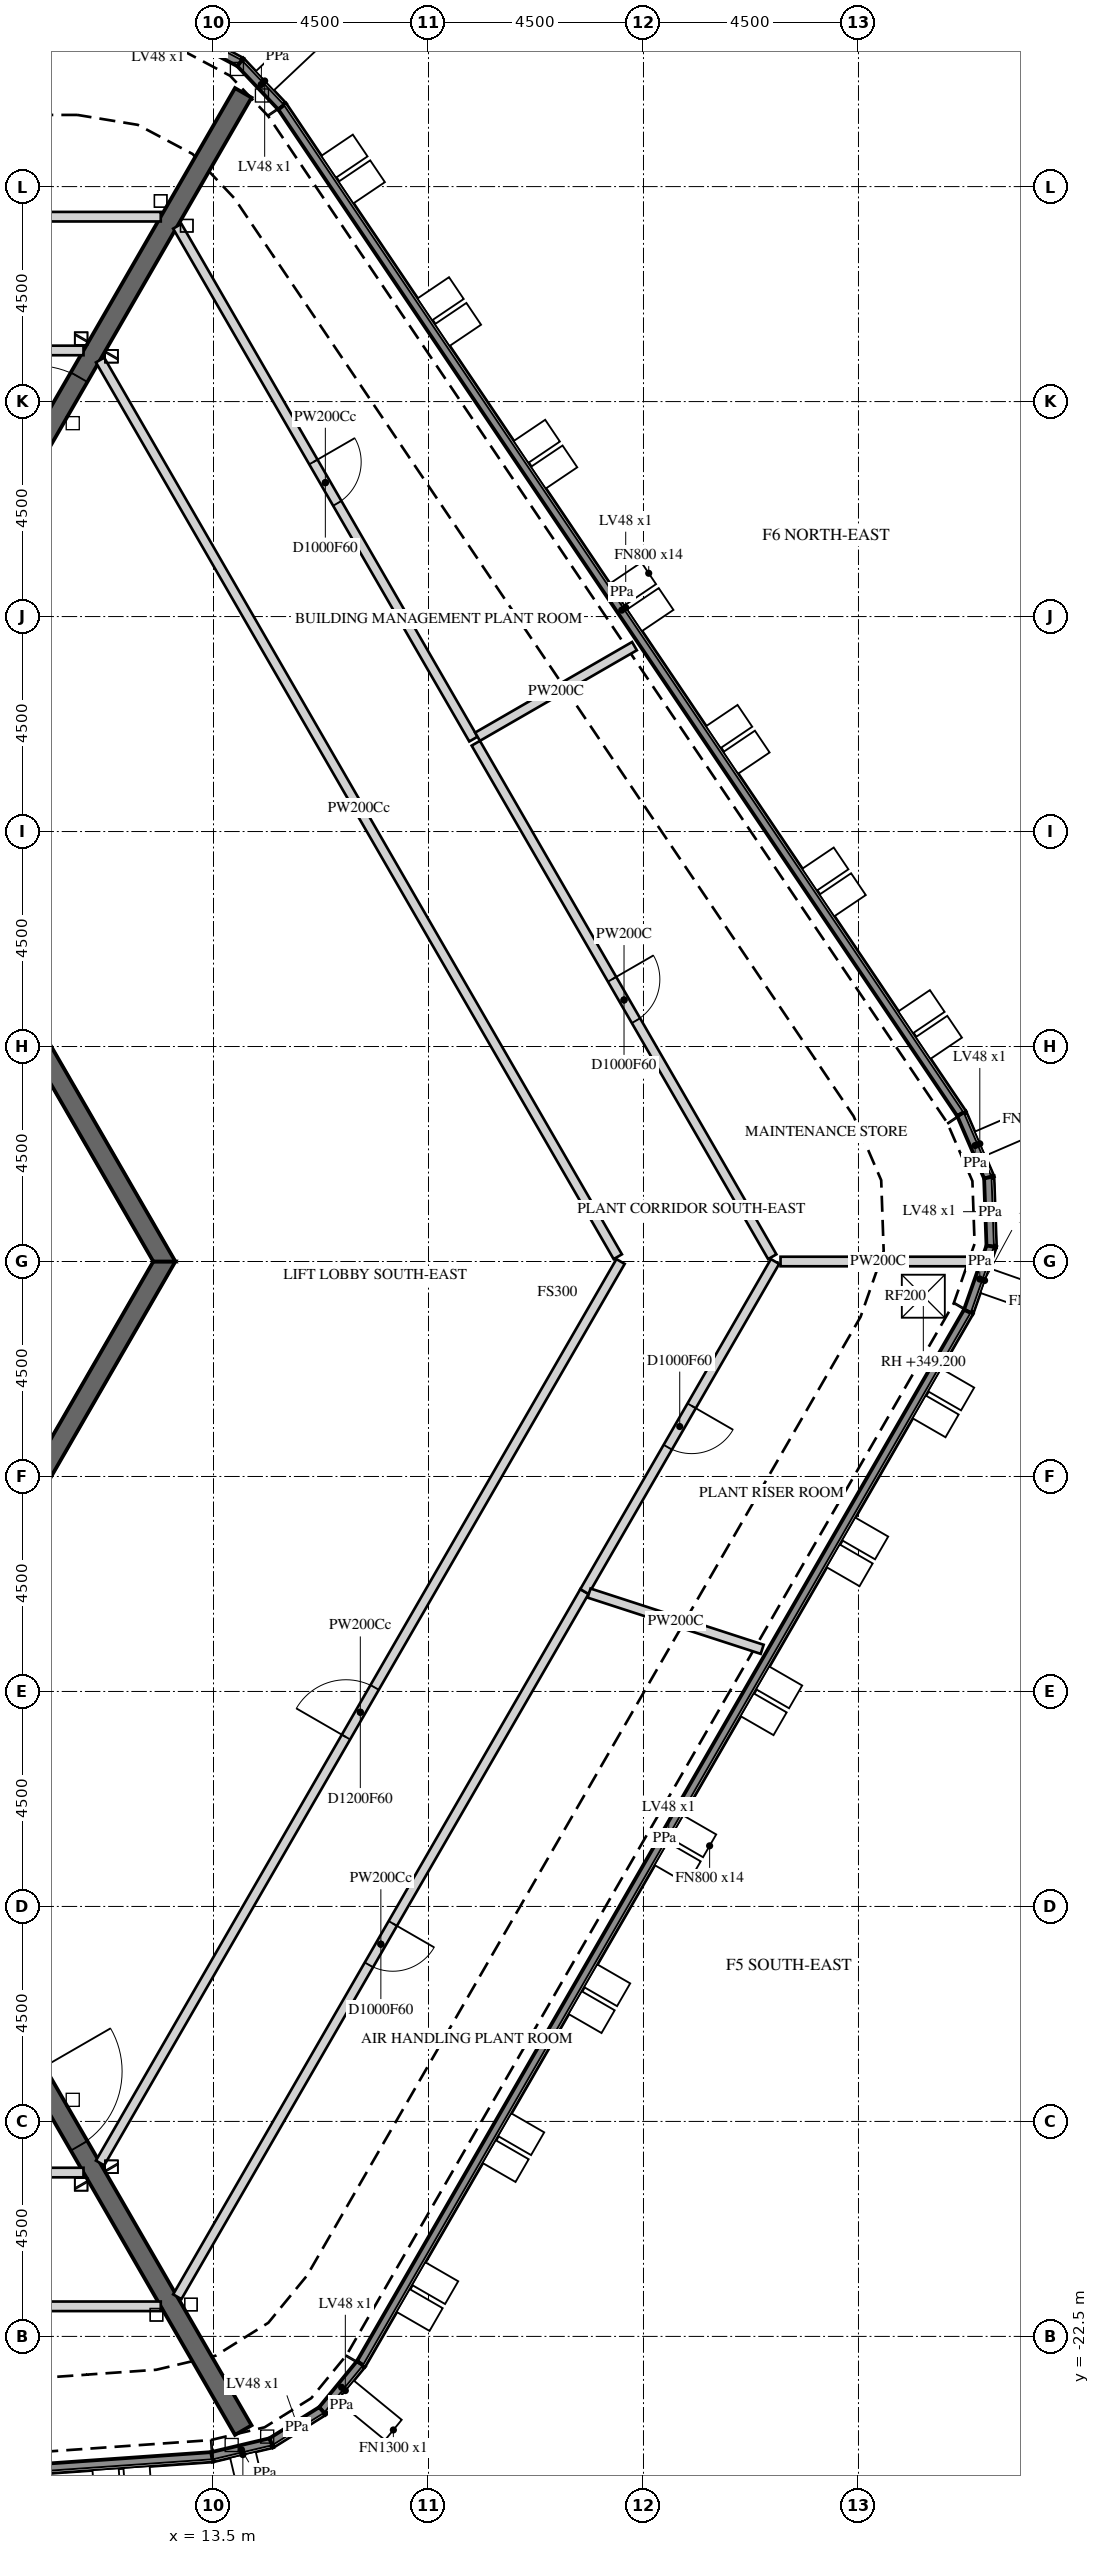
"""IFC4 building model, lengths in metres.
Left out: names, types, materials, properties, quantities, classifications, styles, units other than length and angle.
Written with IfcOpenShell. Run it as: python <this file> out.ifc"""

import sys

from ifc_helpers import new_model, si_unit, direction, frame, frame_2d, origin, origin_2d, place, context, subcontext, project, spatial, polyline, rectangle, outline, extrude, element, fill, save


model = new_model("IFC4")
c1 = context("Model", 3, precision=1e-05, world=origin(), true_north=direction((0.0, 1.0)))
c2 = subcontext(c1, "Body", "Model", "MODEL_VIEW")
j1 = project(units=[si_unit("LENGTHUNIT", "METRE"), si_unit("PLANEANGLEUNIT", "RADIAN")], contexts=[c1])
p1 = place(None, origin())
s1 = spatial("IfcSite", under=j1, at=p1, CompositionType="ELEMENT")
p2 = place(p1, origin())
s2 = spatial("IfcBuilding", under=s1, at=p2, CompositionType="ELEMENT")
p3 = place(p2, frame((0.0, 0.0, 343.5)))
s3 = spatial("IfcBuildingStorey", under=s2, at=p3, CompositionType="ELEMENT", Elevation=343.5)
p4 = place(p3, frame((12.945, 25.694, 5.7), z_axis=(0.0, 0.0, 1.0), x_axis=(0.882950708751, -0.469465702598, 0.0)))
e1 = element("IfcWall", 1, at=p4, inside=s3, PredefinedType="PARAPET", context=c2, shape_type="SweptSolid", body=[
    extrude(outline(polyline([(0.016, -0.1), (1.248, -0.1), (1.281, 0.1), (-0.016, 0.1), (0.016, -0.1)])), origin(), (0.0, 0.0, 1.0), 1.1),
])
p5 = place(p3, frame((14.062, 25.1, 5.7), z_axis=(0.0, 0.0, 1.0), x_axis=(0.686184039693, -0.727427978339, 0.0)))
e2 = element("IfcWall", 2, at=p5, inside=s3, PredefinedType="PARAPET", context=c2, shape_type="SweptSolid", body=[
    extrude(outline(polyline([(0.016, -0.1), (1.265, -0.1), (1.281, 0.1), (-0.016, 0.1), (0.016, -0.1)])), origin(), (0.0, 0.0, 1.0), 1.1),
])
p6 = place(p3, frame((14.935, 24.174, 5.7), z_axis=(0.0, 0.0, 1.0), x_axis=(0.559194464979, -0.829036519302, 0.0)))
e3 = element("IfcWall", 3, at=p6, inside=s3, PredefinedType="PARAPET", context=c2, shape_type="SweptSolid", body=[
    extrude(outline(polyline([(0.008, -0.1), (25.418, -0.1), (25.437, 0.1), (-0.008, 0.1), (0.008, -0.1)])), origin(), (0.0, 0.0, 1.0), 1.1),
])
p7 = place(p3, frame((29.154, 3.094, 5.7), z_axis=(0.0, 0.0, 1.0), x_axis=(0.396149459685, -0.918186040839, 0.0)))
e4 = element("IfcWall", 4, at=p7, inside=s3, PredefinedType="PARAPET", context=c2, shape_type="SweptSolid", body=[
    extrude(outline(polyline([(0.009, -0.1), (1.434, -0.1), (1.471, 0.1), (-0.009, 0.1), (0.009, -0.1)])), origin(), (0.0, 0.0, 1.0), 1.1),
])
p8 = place(p3, frame((29.729, 1.76, 5.7), z_axis=(0.0, 0.0, 1.0), x_axis=(0.034846799115, -0.999392665868, 0.0)))
e5 = element("IfcWall", 5, at=p8, inside=s3, PredefinedType="PARAPET", context=c2, shape_type="SweptSolid", body=[
    extrude(outline(polyline([(0.019, -0.1), (1.425, -0.1), (1.462, 0.1), (-0.019, 0.1), (0.019, -0.1)])), origin(), (0.0, 0.0, 1.0), 1.1),
])
p9 = place(p3, frame((29.78, 0.318, 5.7), z_axis=(0.0, 0.0, 1.0), x_axis=(-0.330964304762, -0.943643274216, 0.0)))
e6 = element("IfcWall", 6, at=p9, inside=s3, PredefinedType="PARAPET", context=c2, shape_type="SweptSolid", body=[
    extrude(outline(polyline([(0.019, -0.1), (1.443, -0.1), (1.462, 0.1), (-0.019, 0.1), (0.019, -0.1)])), origin(), (0.0, 0.0, 1.0), 1.1),
])
p10 = place(p3, frame((29.299, -1.053, 5.7), z_axis=(0.0, 0.0, 1.0), x_axis=(-0.500002269237, -0.866024093636, 0.0)))
e7 = element("IfcWall", 7, at=p10, inside=s3, PredefinedType="PARAPET", context=c2, shape_type="SweptSolid", body=[
    extrude(outline(polyline([(0.009, -0.1), (25.419, -0.1), (25.435, 0.1), (-0.009, 0.1), (0.009, -0.1)])), origin(), (0.0, 0.0, 1.0), 1.1),
])
p11 = place(p3, frame((16.585, -23.073, 5.7), z_axis=(0.0, 0.0, 1.0), x_axis=(-0.633843327274, -0.773461464114, 0.0)))
e8 = element("IfcWall", 8, at=p11, inside=s3, PredefinedType="PARAPET", context=c2, shape_type="SweptSolid", body=[
    extrude(outline(polyline([(0.008, -0.1), (1.257, -0.1), (1.289, 0.1), (-0.008, 0.1), (0.008, -0.1)])), origin(), (0.0, 0.0, 1.0), 1.1),
])
p12 = place(p3, frame((15.779, -24.058, 5.7), z_axis=(0.0, 0.0, 1.0), x_axis=(-0.847998304005, -0.529998940003, 0.0)))
e9 = element("IfcWall", 9, at=p12, inside=s3, PredefinedType="PARAPET", context=c2, shape_type="SweptSolid", body=[
    extrude(outline(polyline([(0.016, -0.1), (1.248, -0.1), (1.281, 0.1), (-0.016, 0.1), (0.016, -0.1)])), origin(), (0.0, 0.0, 1.0), 1.1),
])
p13 = place(p3, frame((14.706, -24.728, 5.7), z_axis=(0.0, 0.0, 1.0), x_axis=(-0.97305877523, -0.230557194525, 0.0)))
e10 = element("IfcWall", 10, at=p13, inside=s3, PredefinedType="PARAPET", context=c2, shape_type="SweptSolid", body=[
    extrude(outline(polyline([(0.016, -0.1), (1.265, -0.1), (1.281, 0.1), (-0.016, 0.1), (0.016, -0.1)])), origin(), (0.0, 0.0, 1.0), 1.1),
])
p14 = place(p3, frame((13.468, -25.021, 5.7), z_axis=(0.0, 0.0, 1.0), x_axis=(-0.997564174518, -0.069754696747, 0.0)))
e11 = element("IfcWall", 11, at=p14, inside=s3, PredefinedType="PARAPET", context=c2, shape_type="SweptSolid", body=[
    extrude(outline(polyline([(0.008, -0.1), (25.418, -0.1), (25.437, 0.1), (-0.008, 0.1), (0.008, -0.1)])), origin(), (0.0, 0.0, 1.0), 1.1),
])
p15 = place(p3, frame((6.235, -10.8, -0.3), z_axis=(0.0, 0.0, 1.0), x_axis=(0.499996419489, 0.866027470984, 0.0)))
e12 = element("IfcWall", 12, at=p15, inside=s3, PredefinedType="SHEAR", context=c2, shape_type="SweptSolid", body=[
    extrude(outline(polyline([(-0.115, -0.2), (12.586, -0.2), (12.355, 0.2), (0.115, 0.2), (-0.115, -0.2)])), origin(), (0.0, 0.0, 1.0), 5.8),
])
p16 = place(p15, frame((5.364, 0.0, 0.3)))
e13 = element("IfcOpeningElement", 13, at=p16, cuts=e12, PredefinedType="OPENING", context=c2, shape_type="SweptSolid", body=[
    extrude(rectangle(XDim=1.8, YDim=2.4, at=frame_2d((0.9, 1.2))), frame((0.0, 0.21, 0.0), z_axis=(0.0, -1.0, 0.0), x_axis=(1.0, 0.0, 0.0)), (0.0, 0.0, 1.0), 0.42),
])
p17 = place(p3, frame((12.471, 0.0, -0.3), z_axis=(0.0, 0.0, 1.0), x_axis=(-0.499996419489, 0.866027470984, 0.0)))
e14 = element("IfcWall", 14, at=p17, inside=s3, PredefinedType="SHEAR", context=c2, shape_type="SweptSolid", body=[
    extrude(outline(polyline([(-0.115, -0.2), (12.586, -0.2), (12.355, 0.2), (0.115, 0.2), (-0.115, -0.2)])), origin(), (0.0, 0.0, 1.0), 5.8),
])
p18 = place(p17, frame((5.306, 0.0, 0.3)))
e15 = element("IfcOpeningElement", 15, at=p18, cuts=e14, PredefinedType="OPENING", context=c2, shape_type="SweptSolid", body=[
    extrude(rectangle(XDim=1.8, YDim=2.4, at=frame_2d((0.9, 1.2))), frame((0.0, 0.21, 0.0), z_axis=(0.0, -1.0, 0.0), x_axis=(1.0, 0.0, 0.0)), (0.0, 0.0, 1.0), 0.42),
])
p19 = place(p3, frame((6.351, 11.0, -0.3), z_axis=(0.0, 0.0, 1.0), x_axis=(0.499998894578, 0.866026041999, 0.0)))
e16 = element("IfcWall", 16, at=p19, inside=s3, PredefinedType="SHEAR", context=c2, shape_type="SweptSolid", body=[
    extrude(rectangle(XDim=15.544, YDim=0.4, at=frame_2d((7.772, 0.0))), origin(), (0.0, 0.0, 1.0), 5.8),
])
p20 = place(p19, frame((6.872, 0.0, 0.3)))
e17 = element("IfcOpeningElement", 17, at=p20, cuts=e16, PredefinedType="OPENING", context=c2, shape_type="SweptSolid", body=[
    extrude(rectangle(XDim=1.8, YDim=2.4, at=frame_2d((0.9, 1.2))), frame((0.0, 0.21, 0.0), z_axis=(0.0, -1.0, 0.0), x_axis=(1.0, 0.0, 0.0)), (0.0, 0.0, 1.0), 0.42),
])
p21 = place(p3, frame((6.351, -11.0, -0.3), z_axis=(0.0, 0.0, 1.0), x_axis=(0.499998894578, -0.866026041999, 0.0)))
e18 = element("IfcWall", 18, at=p21, inside=s3, PredefinedType="SHEAR", context=c2, shape_type="SweptSolid", body=[
    extrude(rectangle(XDim=15.544, YDim=0.4, at=frame_2d((7.772, 0.0))), origin(), (0.0, 0.0, 1.0), 5.8),
])
p22 = place(p21, frame((6.872, 0.0, 0.3)))
e19 = element("IfcOpeningElement", 19, at=p22, cuts=e18, PredefinedType="OPENING", context=c2, shape_type="SweptSolid", body=[
    extrude(rectangle(XDim=1.8, YDim=2.4, at=frame_2d((0.9, 1.2))), frame((0.0, 0.21, 0.0), z_axis=(0.0, -1.0, 0.0), x_axis=(1.0, 0.0, 0.0)), (0.0, 0.0, 1.0), 0.42),
])
p23 = place(p3, frame((-6.064, -19.07, 0.0), z_axis=(0.0, 0.0, 1.0), x_axis=(1.0, 0.0, 0.0)))
e20 = element("IfcWall", 20, at=p23, inside=s3, PredefinedType="PARTITIONING", context=c2, shape_type="SweptSolid", body=[
    extrude(rectangle(XDim=16.844, YDim=0.2, at=frame_2d((8.422, 0.0))), origin(), (0.0, 0.0, 1.0), 5.5),
])
p24 = place(p23, frame((7.822, 0.0, 0.0)))
e21 = element("IfcOpeningElement", 21, at=p24, cuts=e20, PredefinedType="OPENING", context=c2, shape_type="SweptSolid", body=[
    extrude(rectangle(XDim=1.2, YDim=2.1, at=frame_2d((0.6, 1.05))), frame((0.0, 0.11, 0.0), z_axis=(0.0, -1.0, 0.0), x_axis=(1.0, 0.0, 0.0)), (0.0, 0.0, 1.0), 0.22),
])
p25 = place(p3, frame((12.396, -21.87, 0.0), z_axis=(0.0, 0.0, 1.0), x_axis=(-1.0, 0.0, 0.0)))
e22 = element("IfcWall", 22, at=p25, inside=s3, PredefinedType="PARTITIONING", context=c2, shape_type="SweptSolid", body=[
    extrude(rectangle(XDim=9.167, YDim=0.2, at=frame_2d((4.583, 0.0))), origin(), (0.0, 0.0, 1.0), 5.5),
])
p26 = place(p25, frame((4.083, 0.0, 0.0)))
e23 = element("IfcOpeningElement", 23, at=p26, cuts=e22, PredefinedType="OPENING", context=c2, shape_type="SweptSolid", body=[
    extrude(rectangle(XDim=1.0, YDim=2.1, at=frame_2d((0.5, 1.05))), frame((0.0, 0.11, 0.0), z_axis=(0.0, -1.0, 0.0), x_axis=(1.0, 0.0, 0.0)), (0.0, 0.0, 1.0), 0.22),
])
p27 = place(p3, frame((10.779, 19.07, 0.0), z_axis=(0.0, 0.0, 1.0), x_axis=(-1.0, 0.0, 0.0)))
e24 = element("IfcWall", 24, at=p27, inside=s3, PredefinedType="PARTITIONING", context=c2, shape_type="SweptSolid", body=[
    extrude(rectangle(XDim=21.674, YDim=0.2, at=frame_2d((10.837, 0.0))), origin(), (0.0, 0.0, 1.0), 5.5),
])
p28 = place(p3, frame((11.126, -18.87, 0.0), z_axis=(0.0, 0.0, 1.0), x_axis=(0.499978511878, 0.866037809602, 0.0)))
e25 = element("IfcWall", 25, at=p28, inside=s3, PredefinedType="PARTITIONING", context=c2, shape_type="SweptSolid", body=[
    extrude(rectangle(XDim=21.789, YDim=0.2, at=frame_2d((10.895, 0.0))), origin(), (0.0, 0.0, 1.0), 4.573),
])
p29 = place(p28, frame((10.294, 0.0, 0.0)))
e26 = element("IfcOpeningElement", 26, at=p29, cuts=e25, PredefinedType="OPENING", context=c2, shape_type="SweptSolid", body=[
    extrude(rectangle(XDim=1.2, YDim=2.1, at=frame_2d((0.6, 1.05))), frame((0.0, 0.11, 0.0), z_axis=(0.0, -1.0, 0.0), x_axis=(1.0, 0.0, 0.0)), (0.0, 0.0, 1.0), 0.22),
])
p30 = place(p3, frame((-7.001, 21.87, 0.0), z_axis=(0.0, 0.0, 1.0), x_axis=(1.0, 0.0, 0.0)))
e27 = element("IfcWall", 27, at=p30, inside=s3, PredefinedType="PARTITIONING", context=c2, shape_type="SweptSolid", body=[
    extrude(rectangle(XDim=19.397, YDim=0.2, at=frame_2d((9.698, 0.0))), origin(), (0.0, 0.0, 1.0), 5.5),
])
p31 = place(p30, frame((9.198, 0.0, 0.0)))
e28 = element("IfcOpeningElement", 28, at=p31, cuts=e27, PredefinedType="OPENING", context=c2, shape_type="SweptSolid", body=[
    extrude(rectangle(XDim=1.0, YDim=2.1, at=frame_2d((0.5, 1.05))), frame((0.0, 0.11, 0.0), z_axis=(0.0, -1.0, 0.0), x_axis=(1.0, 0.0, 0.0)), (0.0, 0.0, 1.0), 0.22),
])
p32 = place(p3, frame((21.264, -6.909, 0.0), z_axis=(0.0, 0.0, 1.0), x_axis=(-0.499987381101, -0.866032689187, 0.0)))
e29 = element("IfcWall", 29, at=p32, inside=s3, PredefinedType="PARTITIONING", context=c2, shape_type="SweptSolid", body=[
    extrude(rectangle(XDim=17.044, YDim=0.2, at=frame_2d((8.522, 0.0))), origin(), (0.0, 0.0, 1.0), 4.573),
])
p33 = place(p32, frame((8.022, 0.0, 0.0)))
e30 = element("IfcOpeningElement", 30, at=p33, cuts=e29, PredefinedType="OPENING", context=c2, shape_type="SweptSolid", body=[
    extrude(rectangle(XDim=1.0, YDim=2.1, at=frame_2d((0.5, 1.05))), frame((0.0, 0.11, 0.0), z_axis=(0.0, -1.0, 0.0), x_axis=(1.0, 0.0, 0.0)), (0.0, 0.0, 1.0), 0.22),
])
p34 = place(p3, frame((12.742, 21.67, 0.0), z_axis=(0.0, 0.0, 1.0), x_axis=(0.500013422481, -0.866017654173, 0.0)))
e31 = element("IfcWall", 31, at=p34, inside=s3, PredefinedType="PARTITIONING", context=c2, shape_type="SweptSolid", body=[
    extrude(rectangle(XDim=12.396, YDim=0.2, at=frame_2d((6.198, 0.0))), origin(), (0.0, 0.0, 1.0), 4.573),
])
p35 = place(p34, frame((5.698, 0.0, 0.0)))
e32 = element("IfcOpeningElement", 32, at=p35, cuts=e31, PredefinedType="OPENING", context=c2, shape_type="SweptSolid", body=[
    extrude(rectangle(XDim=1.0, YDim=2.1, at=frame_2d((0.5, 1.05))), frame((0.0, 0.11, 0.0), z_axis=(0.0, -1.0, 0.0), x_axis=(1.0, 0.0, 0.0)), (0.0, 0.0, 1.0), 0.22),
])
p36 = place(p3, frame((25.253, 0.0, 0.0), z_axis=(0.0, 0.0, 1.0), x_axis=(-0.500012961574, -0.866017920287, 0.0)))
e33 = element("IfcWall", 33, at=p36, inside=s3, PredefinedType="PARTITIONING", context=c2, shape_type="SweptSolid", body=[
    extrude(rectangle(XDim=7.978, YDim=0.2, at=frame_2d((3.989, 0.0))), origin(), (0.0, 0.0, 1.0), 5.5),
])
p37 = place(p36, frame((3.489, 0.0, 0.0)))
e34 = element("IfcOpeningElement", 34, at=p37, cuts=e33, PredefinedType="OPENING", context=c2, shape_type="SweptSolid", body=[
    extrude(rectangle(XDim=1.0, YDim=2.1, at=frame_2d((0.5, 1.05))), frame((0.0, 0.11, 0.0), z_axis=(0.0, -1.0, 0.0), x_axis=(1.0, 0.0, 0.0)), (0.0, 0.0, 1.0), 0.22),
])
p38 = place(p3, frame((21.962, 0.1, 0.0), z_axis=(0.0, 0.0, 1.0), x_axis=(-0.499975977678, 0.866039272634, 0.0)))
e35 = element("IfcWall", 35, at=p38, inside=s3, PredefinedType="PARTITIONING", context=c2, shape_type="SweptSolid", body=[
    extrude(rectangle(XDim=21.673, YDim=0.2, at=frame_2d((10.837, 0.0))), origin(), (0.0, 0.0, 1.0), 4.573),
])
p39 = place(p3, frame((22.311, 12.881, 0.0), z_axis=(0.0, 0.0, 1.0), x_axis=(-0.866071964568, -0.499919345684, 0.0)))
e36 = element("IfcWall", 36, at=p39, inside=s3, PredefinedType="PARTITIONING", context=c2, shape_type="SweptSolid", body=[
    extrude(rectangle(XDim=3.793, YDim=0.2, at=frame_2d((1.896, 0.0))), origin(), (0.0, 0.0, 1.0), 5.5),
])
p40 = place(p3, frame((24.984, -8.118, 0.0), z_axis=(0.0, 0.0, 1.0), x_axis=(-0.951046784688, 0.309046943579, 0.0)))
e37 = element("IfcWall", 37, at=p40, inside=s3, PredefinedType="PARTITIONING", context=c2, shape_type="SweptSolid", body=[
    extrude(rectangle(XDim=3.809, YDim=0.2, at=frame_2d((1.905, 0.0))), origin(), (0.0, 0.0, 1.0), 5.5),
])
p41 = place(p3, frame((18.99, 10.848, 0.0), z_axis=(0.0, 0.0, 1.0), x_axis=(0.499987524342, -0.866032606489, 0.0)))
e38 = element("IfcWall", 38, at=p41, inside=s3, PredefinedType="PARTITIONING", context=c2, shape_type="SweptSolid", body=[
    extrude(rectangle(XDim=12.411, YDim=0.2, at=frame_2d((6.206, 0.0))), origin(), (0.0, 0.0, 1.0), 5.5),
])
p42 = place(p41, frame((5.706, 0.0, 0.0)))
e39 = element("IfcOpeningElement", 39, at=p42, cuts=e38, PredefinedType="OPENING", context=c2, shape_type="SweptSolid", body=[
    extrude(rectangle(XDim=1.0, YDim=2.1, at=frame_2d((0.5, 1.05))), frame((0.0, 0.11, 0.0), z_axis=(0.0, -1.0, 0.0), x_axis=(1.0, 0.0, 0.0)), (0.0, 0.0, 1.0), 0.22),
])
p43 = place(p3, frame((29.449, 0.0, 0.0), z_axis=(0.0, 0.0, 1.0), x_axis=(-1.0, 0.0, 0.0)))
e40 = element("IfcWall", 40, at=p43, inside=s3, PredefinedType="PARTITIONING", context=c2, shape_type="SweptSolid", body=[
    extrude(rectangle(XDim=4.081, YDim=0.2, at=frame_2d((2.04, 0.0))), origin(), (0.0, 0.0, 1.0), 5.5),
])
p44 = place(p3, frame((0.0, 0.0, 5.5)))
p45 = place(p44, frame((28.357, -0.727, 0.0)))
p46 = place(p45, frame((0.0, 0.0, 0.15)))
e41 = element("IfcDoor", 41, at=p46, inside=s3, OperationType="SINGLE_SWING_LEFT", PredefinedType="TRAPDOOR", context=c2, shape_type="SweptSolid", body=[
    extrude(rectangle(XDim=0.9, YDim=0.9, at=origin_2d()), origin(), (0.0, 0.0, 1.0), 0.05),
])
p47 = place(p20, origin())
e42 = element("IfcDoor", 42, at=p47, inside=s3, OperationType="DOUBLE_DOOR_SINGLE_SWING", PredefinedType="DOOR", context=c2, shape_type="SweptSolid", body=[
    extrude(rectangle(XDim=1.8, YDim=2.4, at=frame_2d((0.9, 1.2))), frame((0.0, 0.025, 0.0), z_axis=(0.0, -1.0, 0.0), x_axis=(1.0, 0.0, 0.0)), (0.0, 0.0, 1.0), 0.05),
])
fill(e17, e42)
p48 = place(p22, origin())
e43 = element("IfcDoor", 43, at=p48, inside=s3, OperationType="DOUBLE_DOOR_SINGLE_SWING", PredefinedType="DOOR", context=c2, shape_type="SweptSolid", body=[
    extrude(rectangle(XDim=1.8, YDim=2.4, at=frame_2d((0.9, 1.2))), frame((0.0, 0.025, 0.0), z_axis=(0.0, -1.0, 0.0), x_axis=(1.0, 0.0, 0.0)), (0.0, 0.0, 1.0), 0.05),
])
fill(e19, e43)
p49 = place(p29, origin())
e44 = element("IfcDoor", 44, at=p49, inside=s3, OperationType="SINGLE_SWING_LEFT", PredefinedType="DOOR", context=c2, shape_type="SweptSolid", body=[
    extrude(rectangle(XDim=1.2, YDim=2.1, at=frame_2d((0.6, 1.05))), frame((0.0, 0.025, 0.0), z_axis=(0.0, -1.0, 0.0), x_axis=(1.0, 0.0, 0.0)), (0.0, 0.0, 1.0), 0.05),
])
fill(e26, e44)
p50 = place(p33, origin())
e45 = element("IfcDoor", 45, at=p50, inside=s3, OperationType="SINGLE_SWING_LEFT", PredefinedType="DOOR", context=c2, shape_type="SweptSolid", body=[
    extrude(rectangle(XDim=1.0, YDim=2.1, at=frame_2d((0.5, 1.05))), frame((0.0, 0.025, 0.0), z_axis=(0.0, -1.0, 0.0), x_axis=(1.0, 0.0, 0.0)), (0.0, 0.0, 1.0), 0.05),
])
fill(e30, e45)
p51 = place(p35, origin())
e46 = element("IfcDoor", 46, at=p51, inside=s3, OperationType="SINGLE_SWING_RIGHT", PredefinedType="DOOR", context=c2, shape_type="SweptSolid", body=[
    extrude(rectangle(XDim=1.0, YDim=2.1, at=frame_2d((0.5, 1.05))), frame((0.0, 0.025, 0.0), z_axis=(0.0, -1.0, 0.0), x_axis=(1.0, 0.0, 0.0)), (0.0, 0.0, 1.0), 0.05),
])
fill(e32, e46)
p52 = place(p37, origin())
e47 = element("IfcDoor", 47, at=p52, inside=s3, OperationType="SINGLE_SWING_LEFT", PredefinedType="DOOR", context=c2, shape_type="SweptSolid", body=[
    extrude(rectangle(XDim=1.0, YDim=2.1, at=frame_2d((0.5, 1.05))), frame((0.0, 0.025, 0.0), z_axis=(0.0, -1.0, 0.0), x_axis=(1.0, 0.0, 0.0)), (0.0, 0.0, 1.0), 0.05),
])
fill(e34, e47)
p53 = place(p42, origin())
e48 = element("IfcDoor", 48, at=p53, inside=s3, OperationType="SINGLE_SWING_RIGHT", PredefinedType="DOOR", context=c2, shape_type="SweptSolid", body=[
    extrude(rectangle(XDim=1.0, YDim=2.1, at=frame_2d((0.5, 1.05))), frame((0.0, 0.025, 0.0), z_axis=(0.0, -1.0, 0.0), x_axis=(1.0, 0.0, 0.0)), (0.0, 0.0, 1.0), 0.05),
])
fill(e39, e48)
save(model, sys.argv[1])
